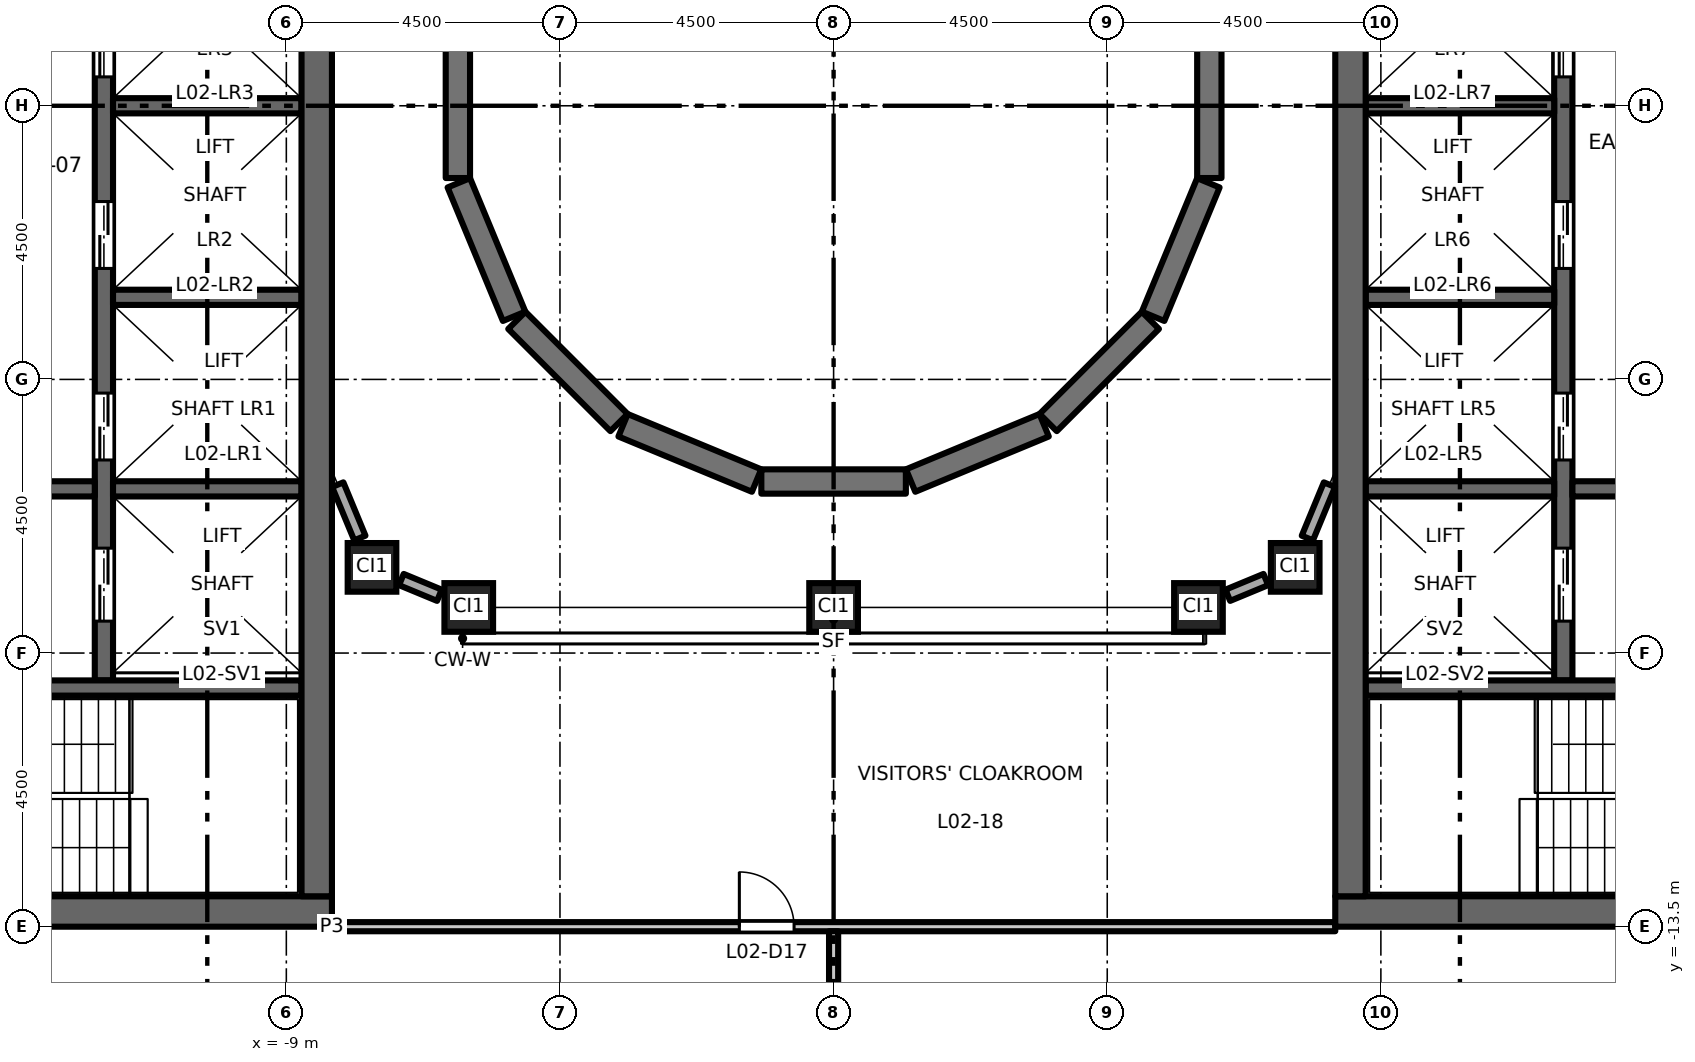
"""IFC4 building model, lengths in metres.
Left out: names, types, materials, properties, quantities, classifications, styles, units other than length and angle.
Written with IfcOpenShell. Run it as: python <this file> out.ifc"""

import sys

from ifc_helpers import new_model, si_unit, direction, frame, frame_2d, origin, origin_2d, place, context, subcontext, project, spatial, rectangle, hollow_rectangle, extrude, element, fill, save


model = new_model("IFC4")
c1 = context("Model", 3, precision=1e-05, world=origin(), true_north=direction((0.0, 1.0)))
c2 = subcontext(c1, "Body", "Model", "MODEL_VIEW")
j1 = project(units=[si_unit("LENGTHUNIT", "METRE"), si_unit("PLANEANGLEUNIT", "RADIAN")], contexts=[c1])
p1 = place(None, origin())
s1 = spatial("IfcSite", under=j1, at=p1, CompositionType="ELEMENT")
p2 = place(p1, origin())
s2 = spatial("IfcBuilding", under=s1, at=p2, CompositionType="ELEMENT")
p3 = place(p2, frame((0.0, 0.0, 12.2)))
s3 = spatial("IfcBuildingStorey", under=s2, at=p3, CompositionType="ELEMENT", Elevation=12.2)
for number, where, z_axis, x_axis in (
    (1, (-7.591, -7.591, 0.0), (0.0, 0.0, 1.0), (1.0, 0.0, 0.0)),
    (2, (-6.0, -8.25, 0.0), (0.0, 0.0, 1.0), (1.0, 0.0, 0.0)),
    (3, (0.0, -8.25, 0.0), (0.0, 0.0, 1.0), (1.0, 0.0, 0.0)),
    (4, (6.0, -8.25, 0.0), (0.0, 0.0, 1.0), (1.0, 0.0, 0.0)),
    (5, (7.591, -7.591, 0.0), (0.0, 0.0, 1.0), (1.0, 0.0, 0.0)),
):
    element("IfcColumn", number, at=place(p3, frame(where, z_axis=z_axis, x_axis=x_axis)), inside=s3, PredefinedType="COLUMN", context=c2, shape_type="SweptSolid", body=[
        extrude(hollow_rectangle(XDim=0.8, YDim=0.8, WallThickness=0.05, at=origin_2d()), origin(), (0.0, 0.0, 1.0), 5.0),
    ])
p4 = place(p3, frame((-12.0, -9.45, 0.0), z_axis=(0.0, 0.0, 1.0), x_axis=(0.0, 1.0, 0.0)))
e6 = element("IfcWall", 6, at=p4, inside=s3, PredefinedType="SHEAR", context=c2, shape_type="SweptSolid", body=[
    extrude(rectangle(XDim=18.9, YDim=0.3, at=frame_2d((9.45, 0.0))), origin(), (0.0, 0.0, 1.0), 4.85),
])
p5 = place(p4, frame((3.625, 0.0, 0.0)))
e7 = element("IfcOpeningElement", 7, at=p5, cuts=e6, PredefinedType="OPENING", context=c2, shape_type="SweptSolid", body=[
    extrude(rectangle(XDim=1.1, YDim=2.1, at=frame_2d((0.55, 1.05))), frame((0.0, 0.16, 0.0), z_axis=(0.0, -1.0, 0.0), x_axis=(1.0, 0.0, 0.0)), (0.0, 0.0, 1.0), 0.32),
])
p6 = place(p4, frame((6.775, 0.0, 0.0)))
e8 = element("IfcOpeningElement", 8, at=p6, cuts=e6, PredefinedType="OPENING", context=c2, shape_type="SweptSolid", body=[
    extrude(rectangle(XDim=1.1, YDim=2.1, at=frame_2d((0.55, 1.05))), frame((0.0, 0.16, 0.0), z_axis=(0.0, -1.0, 0.0), x_axis=(1.0, 0.0, 0.0)), (0.0, 0.0, 1.0), 0.32),
])
p7 = place(p4, frame((9.925, 0.0, 0.0)))
e9 = element("IfcOpeningElement", 9, at=p7, cuts=e6, PredefinedType="OPENING", context=c2, shape_type="SweptSolid", body=[
    extrude(rectangle(XDim=1.1, YDim=2.1, at=frame_2d((0.55, 1.05))), frame((0.0, 0.16, 0.0), z_axis=(0.0, -1.0, 0.0), x_axis=(1.0, 0.0, 0.0)), (0.0, 0.0, 1.0), 0.32),
])
p8 = place(p4, frame((13.075, 0.0, 0.0)))
e10 = element("IfcOpeningElement", 10, at=p8, cuts=e6, PredefinedType="OPENING", context=c2, shape_type="SweptSolid", body=[
    extrude(rectangle(XDim=1.1, YDim=2.1, at=frame_2d((0.55, 1.05))), frame((0.0, 0.16, 0.0), z_axis=(0.0, -1.0, 0.0), x_axis=(1.0, 0.0, 0.0)), (0.0, 0.0, 1.0), 0.32),
])
p9 = place(p4, frame((16.725, 0.0, 0.0)))
e11 = element("IfcOpeningElement", 11, at=p9, cuts=e6, PredefinedType="OPENING", context=c2, shape_type="SweptSolid", body=[
    extrude(rectangle(XDim=1.2, YDim=2.1, at=frame_2d((0.6, 1.05))), frame((0.0, 0.16, 0.0), z_axis=(0.0, -1.0, 0.0), x_axis=(1.0, 0.0, 0.0)), (0.0, 0.0, 1.0), 0.32),
])
p10 = place(p4, frame((0.975, 0.0, 0.0)))
e12 = element("IfcOpeningElement", 12, at=p10, cuts=e6, PredefinedType="OPENING", context=c2, shape_type="SweptSolid", body=[
    extrude(rectangle(XDim=1.2, YDim=2.1, at=frame_2d((0.6, 1.05))), frame((0.0, 0.16, 0.0), z_axis=(0.0, -1.0, 0.0), x_axis=(1.0, 0.0, 0.0)), (0.0, 0.0, 1.0), 0.32),
])
p11 = place(p3, frame((-12.15, -6.3, 0.0), z_axis=(0.0, 0.0, 1.0), x_axis=(-1.0, 0.0, 0.0)))
e13 = element("IfcWall", 13, at=p11, inside=s3, PredefinedType="SHEAR", context=c2, shape_type="SweptSolid", body=[
    extrude(rectangle(XDim=9.1, YDim=0.25, at=frame_2d((4.55, 0.0))), origin(), (0.0, 0.0, 1.0), 4.85),
])
p12 = place(p11, frame((1.8, 0.0, 0.0)))
e14 = element("IfcOpeningElement", 14, at=p12, cuts=e13, PredefinedType="OPENING", context=c2, shape_type="SweptSolid", body=[
    extrude(rectangle(XDim=1.0, YDim=2.1, at=frame_2d((0.5, 1.05))), frame((0.0, 0.135, 0.0), z_axis=(0.0, -1.0, 0.0), x_axis=(1.0, 0.0, 0.0)), (0.0, 0.0, 1.0), 0.27),
])
p13 = place(p11, frame((5.55, 0.0, 0.0)))
e15 = element("IfcOpeningElement", 15, at=p13, cuts=e13, PredefinedType="OPENING", context=c2, shape_type="SweptSolid", body=[
    extrude(rectangle(XDim=0.9, YDim=2.1, at=frame_2d((0.45, 1.05))), frame((0.0, 0.135, 0.0), z_axis=(0.0, -1.0, 0.0), x_axis=(1.0, 0.0, 0.0)), (0.0, 0.0, 1.0), 0.27),
])
p14 = place(p11, frame((7.55, 0.0, 0.0)))
e16 = element("IfcOpeningElement", 16, at=p14, cuts=e13, PredefinedType="OPENING", context=c2, shape_type="SweptSolid", body=[
    extrude(rectangle(XDim=0.9, YDim=2.1, at=frame_2d((0.45, 1.05))), frame((0.0, 0.135, 0.0), z_axis=(0.0, -1.0, 0.0), x_axis=(1.0, 0.0, 0.0)), (0.0, 0.0, 1.0), 0.27),
])
for number, where, z_axis, x_axis in (
    (17, (-8.75, 0.0, 0.0), (0.0, 0.0, 1.0), (-1.0, 0.0, 0.0)),
    (18, (-8.75, -3.15, 0.0), (0.0, 0.0, 1.0), (-1.0, 0.0, 0.0)),
    (19, (-8.75, -6.3, 0.0), (0.0, 0.0, 1.0), (-1.0, 0.0, 0.0)),
):
    element("IfcWall", number, at=place(p3, frame(where, z_axis=z_axis, x_axis=x_axis)), inside=s3, PredefinedType="SHEAR", context=c2, shape_type="SweptSolid", body=[
        extrude(rectangle(XDim=3.1, YDim=0.25, at=frame_2d((1.55, 0.0))), origin(), (0.0, 0.0, 1.0), 4.85),
    ])
p15 = place(p3, frame((-8.75, -9.575, 0.0), z_axis=(0.0, 0.0, 1.0), x_axis=(-1.0, 0.0, 0.0)))
e20 = element("IfcWall", 20, at=p15, inside=s3, PredefinedType="SHEAR", context=c2, shape_type="SweptSolid", body=[
    extrude(rectangle(XDim=8.0, YDim=0.25, at=frame_2d((4.0, 0.0))), origin(), (0.0, 0.0, 1.0), 4.85),
])
p16 = place(p15, frame((6.65, 0.0, 0.0)))
e21 = element("IfcOpeningElement", 21, at=p16, cuts=e20, PredefinedType="OPENING", context=c2, shape_type="SweptSolid", body=[
    extrude(rectangle(XDim=1.1, YDim=2.1, at=frame_2d((0.55, 1.05))), frame((0.0, 0.135, 0.0), z_axis=(0.0, -1.0, 0.0), x_axis=(1.0, 0.0, 0.0)), (0.0, 0.0, 1.0), 0.27),
])
p17 = place(p3, frame((-8.25, -13.25, 0.0), z_axis=(0.0, 0.0, 1.0), x_axis=(-1.0, 0.0, 0.0)))
e22 = element("IfcWall", 22, at=p17, inside=s3, PredefinedType="SHEAR", context=c2, shape_type="SweptSolid", body=[
    extrude(rectangle(XDim=13.5, YDim=0.5, at=frame_2d((6.75, 0.0))), origin(), (0.0, 0.0, 1.0), 4.85),
])
p18 = place(p3, frame((-8.5, -13.0, 0.0), z_axis=(0.0, 0.0, 1.0), x_axis=(0.0, 1.0, 0.0)))
e23 = element("IfcWall", 23, at=p18, inside=s3, PredefinedType="SHEAR", context=c2, shape_type="SweptSolid", body=[
    extrude(rectangle(XDim=26.0, YDim=0.5, at=frame_2d((13.0, 0.0))), origin(), (0.0, 0.0, 1.0), 4.85),
])
p19 = place(p3, frame((12.0, -9.45, 0.0), z_axis=(0.0, 0.0, 1.0), x_axis=(0.0, 1.0, 0.0)))
e24 = element("IfcWall", 24, at=p19, inside=s3, PredefinedType="SHEAR", context=c2, shape_type="SweptSolid", body=[
    extrude(rectangle(XDim=18.9, YDim=0.3, at=frame_2d((9.45, 0.0))), origin(), (0.0, 0.0, 1.0), 4.85),
])
p20 = place(p19, frame((3.625, 0.0, 0.0)))
e25 = element("IfcOpeningElement", 25, at=p20, cuts=e24, PredefinedType="OPENING", context=c2, shape_type="SweptSolid", body=[
    extrude(rectangle(XDim=1.1, YDim=2.1, at=frame_2d((0.55, 1.05))), frame((0.0, 0.16, 0.0), z_axis=(0.0, -1.0, 0.0), x_axis=(1.0, 0.0, 0.0)), (0.0, 0.0, 1.0), 0.32),
])
p21 = place(p19, frame((6.775, 0.0, 0.0)))
e26 = element("IfcOpeningElement", 26, at=p21, cuts=e24, PredefinedType="OPENING", context=c2, shape_type="SweptSolid", body=[
    extrude(rectangle(XDim=1.1, YDim=2.1, at=frame_2d((0.55, 1.05))), frame((0.0, 0.16, 0.0), z_axis=(0.0, -1.0, 0.0), x_axis=(1.0, 0.0, 0.0)), (0.0, 0.0, 1.0), 0.32),
])
p22 = place(p19, frame((9.925, 0.0, 0.0)))
e27 = element("IfcOpeningElement", 27, at=p22, cuts=e24, PredefinedType="OPENING", context=c2, shape_type="SweptSolid", body=[
    extrude(rectangle(XDim=1.1, YDim=2.1, at=frame_2d((0.55, 1.05))), frame((0.0, 0.16, 0.0), z_axis=(0.0, -1.0, 0.0), x_axis=(1.0, 0.0, 0.0)), (0.0, 0.0, 1.0), 0.32),
])
p23 = place(p19, frame((13.075, 0.0, 0.0)))
e28 = element("IfcOpeningElement", 28, at=p23, cuts=e24, PredefinedType="OPENING", context=c2, shape_type="SweptSolid", body=[
    extrude(rectangle(XDim=1.1, YDim=2.1, at=frame_2d((0.55, 1.05))), frame((0.0, 0.16, 0.0), z_axis=(0.0, -1.0, 0.0), x_axis=(1.0, 0.0, 0.0)), (0.0, 0.0, 1.0), 0.32),
])
p24 = place(p19, frame((16.725, 0.0, 0.0)))
e29 = element("IfcOpeningElement", 29, at=p24, cuts=e24, PredefinedType="OPENING", context=c2, shape_type="SweptSolid", body=[
    extrude(rectangle(XDim=1.2, YDim=2.1, at=frame_2d((0.6, 1.05))), frame((0.0, 0.16, 0.0), z_axis=(0.0, -1.0, 0.0), x_axis=(1.0, 0.0, 0.0)), (0.0, 0.0, 1.0), 0.32),
])
p25 = place(p19, frame((0.975, 0.0, 0.0)))
e30 = element("IfcOpeningElement", 30, at=p25, cuts=e24, PredefinedType="OPENING", context=c2, shape_type="SweptSolid", body=[
    extrude(rectangle(XDim=1.2, YDim=2.1, at=frame_2d((0.6, 1.05))), frame((0.0, 0.16, 0.0), z_axis=(0.0, -1.0, 0.0), x_axis=(1.0, 0.0, 0.0)), (0.0, 0.0, 1.0), 0.32),
])
p26 = place(p3, frame((12.15, -6.3, 0.0), z_axis=(0.0, 0.0, 1.0), x_axis=(1.0, 0.0, 0.0)))
e31 = element("IfcWall", 31, at=p26, inside=s3, PredefinedType="SHEAR", context=c2, shape_type="SweptSolid", body=[
    extrude(rectangle(XDim=9.1, YDim=0.25, at=frame_2d((4.55, 0.0))), origin(), (0.0, 0.0, 1.0), 4.85),
])
p27 = place(p26, frame((1.8, 0.0, 0.0)))
e32 = element("IfcOpeningElement", 32, at=p27, cuts=e31, PredefinedType="OPENING", context=c2, shape_type="SweptSolid", body=[
    extrude(rectangle(XDim=1.0, YDim=2.1, at=frame_2d((0.5, 1.05))), frame((0.0, 0.135, 0.0), z_axis=(0.0, -1.0, 0.0), x_axis=(1.0, 0.0, 0.0)), (0.0, 0.0, 1.0), 0.27),
])
p28 = place(p26, frame((7.65, 0.0, 0.0)))
e33 = element("IfcOpeningElement", 33, at=p28, cuts=e31, PredefinedType="OPENING", context=c2, shape_type="SweptSolid", body=[
    extrude(rectangle(XDim=0.9, YDim=2.1, at=frame_2d((0.45, 1.05))), frame((0.0, 0.135, 0.0), z_axis=(0.0, -1.0, 0.0), x_axis=(1.0, 0.0, 0.0)), (0.0, 0.0, 1.0), 0.27),
])
for number, where, z_axis, x_axis in (
    (34, (8.75, 0.0, 0.0), (0.0, 0.0, 1.0), (1.0, 0.0, 0.0)),
    (35, (8.75, -3.15, 0.0), (0.0, 0.0, 1.0), (1.0, 0.0, 0.0)),
    (36, (8.75, -6.3, 0.0), (0.0, 0.0, 1.0), (1.0, 0.0, 0.0)),
):
    element("IfcWall", number, at=place(p3, frame(where, z_axis=z_axis, x_axis=x_axis)), inside=s3, PredefinedType="SHEAR", context=c2, shape_type="SweptSolid", body=[
        extrude(rectangle(XDim=3.1, YDim=0.25, at=frame_2d((1.55, 0.0))), origin(), (0.0, 0.0, 1.0), 4.85),
    ])
p29 = place(p3, frame((8.75, -9.575, 0.0), z_axis=(0.0, 0.0, 1.0), x_axis=(1.0, 0.0, 0.0)))
e37 = element("IfcWall", 37, at=p29, inside=s3, PredefinedType="SHEAR", context=c2, shape_type="SweptSolid", body=[
    extrude(rectangle(XDim=8.0, YDim=0.25, at=frame_2d((4.0, 0.0))), origin(), (0.0, 0.0, 1.0), 4.85),
])
p30 = place(p29, frame((6.65, 0.0, 0.0)))
e38 = element("IfcOpeningElement", 38, at=p30, cuts=e37, PredefinedType="OPENING", context=c2, shape_type="SweptSolid", body=[
    extrude(rectangle(XDim=1.1, YDim=2.1, at=frame_2d((0.55, 1.05))), frame((0.0, 0.135, 0.0), z_axis=(0.0, -1.0, 0.0), x_axis=(1.0, 0.0, 0.0)), (0.0, 0.0, 1.0), 0.27),
])
p31 = place(p3, frame((8.25, -13.25, 0.0), z_axis=(0.0, 0.0, 1.0), x_axis=(1.0, 0.0, 0.0)))
e39 = element("IfcWall", 39, at=p31, inside=s3, PredefinedType="SHEAR", context=c2, shape_type="SweptSolid", body=[
    extrude(rectangle(XDim=13.5, YDim=0.5, at=frame_2d((6.75, 0.0))), origin(), (0.0, 0.0, 1.0), 4.85),
])
p32 = place(p3, frame((8.5, -13.0, 0.0), z_axis=(0.0, 0.0, 1.0), x_axis=(0.0, 1.0, 0.0)))
e40 = element("IfcWall", 40, at=p32, inside=s3, PredefinedType="SHEAR", context=c2, shape_type="SweptSolid", body=[
    extrude(rectangle(XDim=26.0, YDim=0.5, at=frame_2d((13.0, 0.0))), origin(), (0.0, 0.0, 1.0), 4.85),
])
p33 = place(p3, frame((6.483, -8.05, 0.0), z_axis=(0.0, 0.0, 1.0), x_axis=(0.923854141361, 0.382744726273, 0.0)))
e41 = element("IfcWall", 41, at=p33, inside=s3, PredefinedType="STANDARD", context=c2, shape_type="SweptSolid", body=[
    extrude(rectangle(XDim=0.677, YDim=0.2, at=frame_2d((0.338, 0.0))), origin(), (0.0, 0.0, 1.0), 4.23),
])
for number, where, z_axis, x_axis in (
    (42, (7.791, -7.108, 0.0), (0.0, 0.0, 1.0), (0.383, 0.924, 0.0)),
    (43, (-8.154, -6.231, 0.0), (0.0, 0.0, 1.0), (0.383, -0.924, 0.0)),
):
    element("IfcWall", number, at=place(p3, frame(where, z_axis=z_axis, x_axis=x_axis)), inside=s3, PredefinedType="STANDARD", context=c2, shape_type="SweptSolid", body=[
        extrude(rectangle(XDim=0.949, YDim=0.2, at=frame_2d((0.475, 0.0))), origin(), (0.0, 0.0, 1.0), 4.23),
    ])
p34 = place(p3, frame((-7.108, -7.791, 0.0), z_axis=(0.0, 0.0, 1.0), x_axis=(0.923854141361, -0.382744726273, 0.0)))
e44 = element("IfcWall", 44, at=p34, inside=s3, PredefinedType="STANDARD", context=c2, shape_type="SweptSolid", body=[
    extrude(rectangle(XDim=0.677, YDim=0.2, at=frame_2d((0.338, 0.0))), origin(), (0.0, 0.0, 1.0), 4.23),
])
for number, where, z_axis, x_axis in (
    (45, (-6.179, 1.188, 0.0), (0.0, 0.0, 1.0), (0.0, -1.0, 0.0)),
    (46, (-6.163, -1.267, 0.0), (0.0, 0.0, 1.0), (0.383, -0.924, 0.0)),
):
    element("IfcWall", number, at=place(p3, frame(where, z_axis=z_axis, x_axis=x_axis)), inside=s3, PredefinedType="SOLIDWALL", context=c2, shape_type="SweptSolid", body=[
        extrude(rectangle(XDim=2.376, YDim=0.4, at=frame_2d((1.188, 0.0))), origin(), (0.0, 0.0, 1.0), 4.7),
    ])
p35 = place(p3, frame((-5.209, -3.529, 0.0), z_axis=(0.0, 0.0, 1.0), x_axis=(0.707106781187, -0.707106781187, 0.0)))
e47 = element("IfcWall", 47, at=p35, inside=s3, PredefinedType="SOLIDWALL", context=c2, shape_type="SweptSolid", body=[
    extrude(rectangle(XDim=2.377, YDim=0.4, at=frame_2d((1.188, 0.0))), origin(), (0.0, 0.0, 1.0), 4.7),
])
for number, where, z_axis, x_axis in (
    (48, (-3.462, -5.254, 0.0), (0.0, 0.0, 1.0), (0.924, -0.383, 0.0)),
    (49, (-1.188, -6.179, 0.0), (0.0, 0.0, 1.0), (1.0, 0.0, 0.0)),
    (50, (1.267, -6.163, 0.0), (0.0, 0.0, 1.0), (0.924, 0.383, 0.0)),
):
    element("IfcWall", number, at=place(p3, frame(where, z_axis=z_axis, x_axis=x_axis)), inside=s3, PredefinedType="SOLIDWALL", context=c2, shape_type="SweptSolid", body=[
        extrude(rectangle(XDim=2.376, YDim=0.4, at=frame_2d((1.188, 0.0))), origin(), (0.0, 0.0, 1.0), 4.7),
    ])
p36 = place(p3, frame((3.529, -5.209, 0.0), z_axis=(0.0, 0.0, 1.0), x_axis=(0.707106781187, 0.707106781187, 0.0)))
e51 = element("IfcWall", 51, at=p36, inside=s3, PredefinedType="SOLIDWALL", context=c2, shape_type="SweptSolid", body=[
    extrude(rectangle(XDim=2.377, YDim=0.4, at=frame_2d((1.188, 0.0))), origin(), (0.0, 0.0, 1.0), 4.7),
])
for number, where, z_axis, x_axis in (
    (52, (5.254, -3.462, 0.0), (0.0, 0.0, 1.0), (0.383, 0.924, 0.0)),
    (53, (6.179, -1.188, 0.0), (0.0, 0.0, 1.0), (0.0, 1.0, 0.0)),
):
    element("IfcWall", number, at=place(p3, frame(where, z_axis=z_axis, x_axis=x_axis)), inside=s3, PredefinedType="SOLIDWALL", context=c2, shape_type="SweptSolid", body=[
        extrude(rectangle(XDim=2.376, YDim=0.4, at=frame_2d((1.188, 0.0))), origin(), (0.0, 0.0, 1.0), 4.7),
    ])
p37 = place(p3, frame((-8.25, -13.5, 0.0), z_axis=(0.0, 0.0, 1.0), x_axis=(1.0, 0.0, 0.0)))
e54 = element("IfcWall", 54, at=p37, inside=s3, PredefinedType="PARTITIONING", context=c2, shape_type="SweptSolid", body=[
    extrude(rectangle(XDim=16.5, YDim=0.15, at=frame_2d((8.25, 0.0))), origin(), (0.0, 0.0, 1.0), 4.35),
])
p38 = place(p37, frame((6.7, 0.0, 0.0)))
e55 = element("IfcOpeningElement", 55, at=p38, cuts=e54, PredefinedType="OPENING", context=c2, shape_type="SweptSolid", body=[
    extrude(rectangle(XDim=0.9, YDim=2.1, at=frame_2d((0.45, 1.05))), frame((0.0, 0.085, 0.0), z_axis=(0.0, -1.0, 0.0), x_axis=(1.0, 0.0, 0.0)), (0.0, 0.0, 1.0), 0.17),
])
p39 = place(p3, frame((0.0, -20.925, 0.0), z_axis=(0.0, 0.0, 1.0), x_axis=(0.0, 1.0, 0.0)))
e56 = element("IfcWall", 56, at=p39, inside=s3, PredefinedType="PARTITIONING", context=c2, shape_type="SweptSolid", body=[
    extrude(rectangle(XDim=7.35, YDim=0.15, at=frame_2d((3.675, 0.0))), origin(), (0.0, 0.0, 1.0), 4.85),
])
p40 = place(p5, origin())
e57 = element("IfcDoor", 57, at=p40, inside=s3, OperationType="DOUBLE_DOOR_SLIDING", PredefinedType="DOOR", context=c2, shape_type="SweptSolid", body=[
    extrude(rectangle(XDim=1.1, YDim=2.1, at=frame_2d((0.55, 1.05))), frame((0.0, 0.025, 0.0), z_axis=(0.0, -1.0, 0.0), x_axis=(1.0, 0.0, 0.0)), (0.0, 0.0, 1.0), 0.05),
])
fill(e7, e57)
p41 = place(p6, origin())
e58 = element("IfcDoor", 58, at=p41, inside=s3, OperationType="DOUBLE_DOOR_SLIDING", PredefinedType="DOOR", context=c2, shape_type="SweptSolid", body=[
    extrude(rectangle(XDim=1.1, YDim=2.1, at=frame_2d((0.55, 1.05))), frame((0.0, 0.025, 0.0), z_axis=(0.0, -1.0, 0.0), x_axis=(1.0, 0.0, 0.0)), (0.0, 0.0, 1.0), 0.05),
])
fill(e8, e58)
p42 = place(p7, origin())
e59 = element("IfcDoor", 59, at=p42, inside=s3, OperationType="DOUBLE_DOOR_SLIDING", PredefinedType="DOOR", context=c2, shape_type="SweptSolid", body=[
    extrude(rectangle(XDim=1.1, YDim=2.1, at=frame_2d((0.55, 1.05))), frame((0.0, 0.025, 0.0), z_axis=(0.0, -1.0, 0.0), x_axis=(1.0, 0.0, 0.0)), (0.0, 0.0, 1.0), 0.05),
])
fill(e9, e59)
p43 = place(p10, origin())
e60 = element("IfcDoor", 60, at=p43, inside=s3, OperationType="DOUBLE_DOOR_SLIDING", PredefinedType="DOOR", context=c2, shape_type="SweptSolid", body=[
    extrude(rectangle(XDim=1.2, YDim=2.1, at=frame_2d((0.6, 1.05))), frame((0.0, 0.025, 0.0), z_axis=(0.0, -1.0, 0.0), x_axis=(1.0, 0.0, 0.0)), (0.0, 0.0, 1.0), 0.05),
])
fill(e12, e60)
p44 = place(p20, origin())
e61 = element("IfcDoor", 61, at=p44, inside=s3, OperationType="DOUBLE_DOOR_SLIDING", PredefinedType="DOOR", context=c2, shape_type="SweptSolid", body=[
    extrude(rectangle(XDim=1.1, YDim=2.1, at=frame_2d((0.55, 1.05))), frame((0.0, 0.025, 0.0), z_axis=(0.0, -1.0, 0.0), x_axis=(1.0, 0.0, 0.0)), (0.0, 0.0, 1.0), 0.05),
])
fill(e25, e61)
p45 = place(p21, origin())
e62 = element("IfcDoor", 62, at=p45, inside=s3, OperationType="DOUBLE_DOOR_SLIDING", PredefinedType="DOOR", context=c2, shape_type="SweptSolid", body=[
    extrude(rectangle(XDim=1.1, YDim=2.1, at=frame_2d((0.55, 1.05))), frame((0.0, 0.025, 0.0), z_axis=(0.0, -1.0, 0.0), x_axis=(1.0, 0.0, 0.0)), (0.0, 0.0, 1.0), 0.05),
])
fill(e26, e62)
p46 = place(p22, origin())
e63 = element("IfcDoor", 63, at=p46, inside=s3, OperationType="DOUBLE_DOOR_SLIDING", PredefinedType="DOOR", context=c2, shape_type="SweptSolid", body=[
    extrude(rectangle(XDim=1.1, YDim=2.1, at=frame_2d((0.55, 1.05))), frame((0.0, 0.025, 0.0), z_axis=(0.0, -1.0, 0.0), x_axis=(1.0, 0.0, 0.0)), (0.0, 0.0, 1.0), 0.05),
])
fill(e27, e63)
p47 = place(p25, origin())
e64 = element("IfcDoor", 64, at=p47, inside=s3, OperationType="DOUBLE_DOOR_SLIDING", PredefinedType="DOOR", context=c2, shape_type="SweptSolid", body=[
    extrude(rectangle(XDim=1.2, YDim=2.1, at=frame_2d((0.6, 1.05))), frame((0.0, 0.025, 0.0), z_axis=(0.0, -1.0, 0.0), x_axis=(1.0, 0.0, 0.0)), (0.0, 0.0, 1.0), 0.05),
])
fill(e30, e64)
p48 = place(p38, origin())
e65 = element("IfcDoor", 65, at=p48, inside=s3, OperationType="SINGLE_SWING_LEFT", PredefinedType="DOOR", context=c2, shape_type="SweptSolid", body=[
    extrude(rectangle(XDim=0.9, YDim=2.1, at=frame_2d((0.45, 1.05))), frame((0.0, 0.025, 0.0), z_axis=(0.0, -1.0, 0.0), x_axis=(1.0, 0.0, 0.0)), (0.0, 0.0, 1.0), 0.05),
])
fill(e55, e65)
save(model, sys.argv[1])
